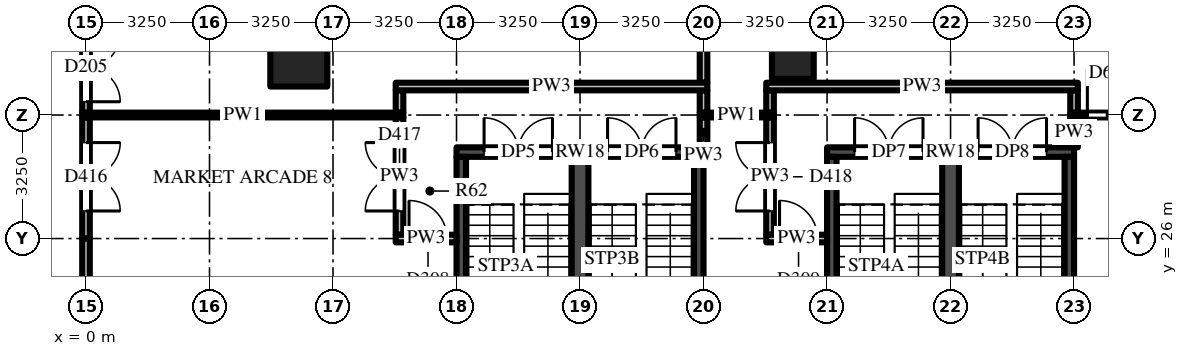
"""IFC4 building model, lengths in metres.
Left out: names, types, materials, properties, quantities, classifications, styles, units other than length and angle.
Written with IfcOpenShell. Run it as: python <this file> out.ifc"""

import sys

from ifc_helpers import new_model, si_unit, direction, frame, frame_2d, origin, origin_2d, place, context, subcontext, project, spatial, rectangle, extrude, source, transform, mapped, element, fill, save


model = new_model("IFC4")
c1 = context("Model", 3, precision=1e-05, world=origin(), true_north=direction((0.0, 1.0)))
c2 = subcontext(c1, "Body", "Model", "MODEL_VIEW")
j1 = project(units=[si_unit("LENGTHUNIT", "METRE"), si_unit("PLANEANGLEUNIT", "RADIAN")], contexts=[c1])
p1 = place(None, origin())
s1 = spatial("IfcSite", under=j1, at=p1, CompositionType="ELEMENT")
p2 = place(p1, origin())
s2 = spatial("IfcBuilding", under=s1, at=p2, CompositionType="ELEMENT")
p3 = place(p2, frame((0.0, 0.0, 19.0)))
s3 = spatial("IfcBuildingStorey", under=s2, at=p3, CompositionType="ELEMENT", Elevation=19.0)
m1 = source(origin(), c2, "Body", "SweptSolid", [
    extrude(rectangle(XDim=1.5, YDim=1.5, at=origin_2d()), origin(), (0.0, 0.0, 1.0), 5.0),
])
p4 = place(p3, frame((5.6, 30.75, 0.0), z_axis=(0.0, 0.0, 1.0), x_axis=(1.0, 0.0, 0.0)))
e1 = element("IfcColumn", 1, at=p4, inside=s3, PredefinedType="COLUMN", context=c2, shape_type="MappedRepresentation", body=[
    mapped(m1, transform((0.0, 0.0, 0.0))),
])
m2 = source(origin(), c2, "Body", "SweptSolid", [
    extrude(rectangle(XDim=1.1, YDim=1.1, at=origin_2d()), origin(), (0.0, 0.0, 1.0), 5.0),
])
p5 = place(p3, frame((18.6, 30.75, 0.0), z_axis=(0.0, 0.0, 1.0), x_axis=(1.0, 0.0, 0.0)))
e2 = element("IfcColumn", 2, at=p5, inside=s3, PredefinedType="COLUMN", context=c2, shape_type="MappedRepresentation", body=[
    mapped(m2, transform((0.0, 0.0, 0.0))),
])
m3 = source(origin(), c2, "Body", "SweptSolid", [
    extrude(rectangle(XDim=6.5, YDim=0.25, at=frame_2d((3.25, 0.0))), origin(), (0.0, 0.0, 1.0), 4.7),
])
p6 = place(p3, frame((9.75, 28.275, 0.0), z_axis=(0.0, 0.0, 1.0), x_axis=(1.0, 0.0, 0.0)))
e3 = element("IfcWall", 3, at=p6, inside=s3, PredefinedType="SHEAR", context=c2, shape_type="MappedRepresentation", body=[
    mapped(m3, transform((0.0, 0.0, 0.0))),
])
m4 = source(origin(), c2, "Body", "SweptSolid", [
    extrude(rectangle(XDim=1.8, YDim=2.1, at=frame_2d((0.9, 1.05))), frame((0.0, 0.135, 0.0), z_axis=(0.0, -1.0, 0.0), x_axis=(1.0, 0.0, 0.0)), (0.0, 0.0, 1.0), 0.27),
])
p7 = place(p6, frame((0.725, 0.0, 0.0)))
e4 = element("IfcOpeningElement", 4, at=p7, cuts=e3, PredefinedType="OPENING", context=c2, shape_type="MappedRepresentation", body=[
    mapped(m4, transform((0.0, 0.0, 0.0))),
])
p8 = place(p6, frame((3.975, 0.0, 0.0)))
e5 = element("IfcOpeningElement", 5, at=p8, cuts=e3, PredefinedType="OPENING", context=c2, shape_type="MappedRepresentation", body=[
    mapped(m4, transform((0.0, 0.0, 0.0))),
])
m5 = source(origin(), c2, "Body", "SweptSolid", [
    extrude(rectangle(XDim=8.3, YDim=0.25, at=frame_2d((4.15, 0.0))), origin(), (0.0, 0.0, 1.0), 4.7),
])
for number, where, z_axis, x_axis in (
    (6, (9.875, 19.85, 0.0), (0.0, 0.0, 1.0), (0.0, 1.0, 0.0)),
    (7, (16.125, 19.85, 0.0), (0.0, 0.0, 1.0), (0.0, 1.0, 0.0)),
):
    element("IfcWall", number, at=place(p3, frame(where, z_axis=z_axis, x_axis=x_axis)), inside=s3, PredefinedType="SHEAR", context=c2, shape_type="MappedRepresentation", body=[
        mapped(m5, transform((0.0, 0.0, 0.0))),
    ])
m6 = source(origin(), c2, "Body", "SweptSolid", [
    extrude(rectangle(XDim=8.3, YDim=0.44, at=frame_2d((4.15, 0.0))), origin(), (0.0, 0.0, 1.0), 4.7),
])
p9 = place(p3, frame((13.0, 19.85, 0.0), z_axis=(0.0, 0.0, 1.0), x_axis=(0.0, 1.0, 0.0)))
e8 = element("IfcWall", 8, at=p9, inside=s3, PredefinedType="SHEAR", context=c2, shape_type="MappedRepresentation", body=[
    mapped(m6, transform((0.0, 0.0, 0.0))),
])
p10 = place(p3, frame((19.5, 28.275, 0.0), z_axis=(0.0, 0.0, 1.0), x_axis=(1.0, 0.0, 0.0)))
e9 = element("IfcWall", 9, at=p10, inside=s3, PredefinedType="SHEAR", context=c2, shape_type="MappedRepresentation", body=[
    mapped(m3, transform((0.0, 0.0, 0.0))),
])
p11 = place(p10, frame((0.725, 0.0, 0.0)))
e10 = element("IfcOpeningElement", 10, at=p11, cuts=e9, PredefinedType="OPENING", context=c2, shape_type="MappedRepresentation", body=[
    mapped(m4, transform((0.0, 0.0, 0.0))),
])
p12 = place(p10, frame((3.975, 0.0, 0.0)))
e11 = element("IfcOpeningElement", 11, at=p12, cuts=e9, PredefinedType="OPENING", context=c2, shape_type="MappedRepresentation", body=[
    mapped(m4, transform((0.0, 0.0, 0.0))),
])
for number, where, z_axis, x_axis in (
    (12, (19.625, 19.85, 0.0), (0.0, 0.0, 1.0), (0.0, 1.0, 0.0)),
    (13, (25.875, 19.85, 0.0), (0.0, 0.0, 1.0), (0.0, 1.0, 0.0)),
):
    element("IfcWall", number, at=place(p3, frame(where, z_axis=z_axis, x_axis=x_axis)), inside=s3, PredefinedType="SHEAR", context=c2, shape_type="MappedRepresentation", body=[
        mapped(m5, transform((0.0, 0.0, 0.0))),
    ])
p13 = place(p3, frame((22.75, 19.85, 0.0), z_axis=(0.0, 0.0, 1.0), x_axis=(0.0, 1.0, 0.0)))
e14 = element("IfcWall", 14, at=p13, inside=s3, PredefinedType="SHEAR", context=c2, shape_type="MappedRepresentation", body=[
    mapped(m6, transform((0.0, 0.0, 0.0))),
])
m7 = source(origin(), c2, "Body", "SweptSolid", [
    extrude(rectangle(XDim=3.188, YDim=0.2, at=frame_2d((1.594, 0.0))), origin(), (0.0, 0.0, 1.0), 3.996),
])
p14 = place(p3, frame((0.0, 29.188, 0.0), z_axis=(0.0, 0.0, 1.0), x_axis=(0.0, -1.0, 0.0)))
e15 = element("IfcWall", 15, at=p14, inside=s3, PredefinedType="PARTITIONING", context=c2, shape_type="MappedRepresentation", body=[
    mapped(m7, transform((0.0, 0.0, 0.0))),
])
m8 = source(origin(), c2, "Body", "SweptSolid", [
    extrude(rectangle(XDim=1.8, YDim=2.1, at=frame_2d((0.9, 1.05))), frame((0.0, 0.11, 0.0), z_axis=(0.0, -1.0, 0.0), x_axis=(1.0, 0.0, 0.0)), (0.0, 0.0, 1.0), 0.22),
])
p15 = place(p14, frame((0.663, 0.0, 0.0)))
e16 = element("IfcOpeningElement", 16, at=p15, cuts=e15, PredefinedType="OPENING", context=c2, shape_type="MappedRepresentation", body=[
    mapped(m8, transform((0.0, 0.0, 0.0))),
])
m9 = source(origin(), c2, "Body", "SweptSolid", [
    extrude(rectangle(XDim=6.5, YDim=0.2, at=frame_2d((3.25, 0.0))), origin(), (0.0, 0.0, 1.0), 3.996),
])
p16 = place(p3, frame((0.0, 26.0, 0.0), z_axis=(0.0, 0.0, 1.0), x_axis=(0.0, -1.0, 0.0)))
e17 = element("IfcWall", 17, at=p16, inside=s3, PredefinedType="PARTITIONING", context=c2, shape_type="MappedRepresentation", body=[
    mapped(m9, transform((0.0, 0.0, 0.0))),
])
m10 = source(origin(), c2, "Body", "SweptSolid", [
    extrude(rectangle(XDim=9.488, YDim=0.2, at=frame_2d((4.744, 0.0))), origin(), (0.0, 0.0, 1.0), 3.918),
])
p17 = place(p3, frame((0.0, 38.8, 0.0), z_axis=(0.0, 0.0, 1.0), x_axis=(0.0, -1.0, 0.0)))
e18 = element("IfcWall", 18, at=p17, inside=s3, PredefinedType="PARTITIONING", context=c2, shape_type="MappedRepresentation", body=[
    mapped(m10, transform((0.0, 0.0, 0.0))),
])
p18 = place(p17, frame((7.4, 0.0, 0.0)))
e19 = element("IfcOpeningElement", 19, at=p18, cuts=e18, PredefinedType="OPENING", context=c2, shape_type="MappedRepresentation", body=[
    mapped(m8, transform((0.0, 0.0, 0.0))),
])
m11 = source(origin(), c2, "Body", "SweptSolid", [
    extrude(rectangle(XDim=3.087, YDim=0.2, at=frame_2d((1.544, 0.0))), origin(), (0.0, 0.0, 1.0), 4.274),
])
p19 = place(p3, frame((8.25, 26.1, 0.0), z_axis=(0.0, 0.0, 1.0), x_axis=(0.0, 1.0, 0.0)))
e20 = element("IfcWall", 20, at=p19, inside=s3, PredefinedType="PARTITIONING", context=c2, shape_type="MappedRepresentation", body=[
    mapped(m11, transform((0.0, 0.0, 0.0))),
])
p20 = place(p19, frame((0.625, 0.0, 0.0)))
e21 = element("IfcOpeningElement", 21, at=p20, cuts=e20, PredefinedType="OPENING", context=c2, shape_type="MappedRepresentation", body=[
    mapped(m8, transform((0.0, 0.0, 0.0))),
])
m12 = source(origin(), c2, "Body", "SweptSolid", [
    extrude(rectangle(XDim=0.587, YDim=0.2, at=frame_2d((0.294, 0.0))), origin(), (0.0, 0.0, 1.0), 4.7),
])
p21 = place(p3, frame((8.25, 29.312, 0.0), z_axis=(0.0, 0.0, 1.0), x_axis=(0.0, 1.0, 0.0)))
e22 = element("IfcWall", 22, at=p21, inside=s3, PredefinedType="PARTITIONING", context=c2, shape_type="MappedRepresentation", body=[
    mapped(m12, transform((0.0, 0.0, 0.0))),
])
m13 = source(origin(), c2, "Body", "SweptSolid", [
    extrude(rectangle(XDim=0.788, YDim=0.2, at=frame_2d((0.394, 0.0))), origin(), (0.0, 0.0, 1.0), 4.7),
])
p22 = place(p3, frame((16.25, 28.4, 0.0), z_axis=(0.0, 0.0, 1.0), x_axis=(0.0, 1.0, 0.0)))
e23 = element("IfcWall", 23, at=p22, inside=s3, PredefinedType="PARTITIONING", context=c2, shape_type="MappedRepresentation", body=[
    mapped(m13, transform((0.0, 0.0, 0.0))),
])
m14 = source(origin(), c2, "Body", "SweptSolid", [
    extrude(rectangle(XDim=8.7, YDim=0.2, at=frame_2d((4.35, 0.0))), origin(), (0.0, 0.0, 1.0), 3.762),
])
p23 = place(p3, frame((16.25, 30.1, 0.0), z_axis=(0.0, 0.0, 1.0), x_axis=(0.0, 1.0, 0.0)))
e24 = element("IfcWall", 24, at=p23, inside=s3, PredefinedType="PARTITIONING", context=c2, shape_type="MappedRepresentation", body=[
    mapped(m14, transform((0.0, 0.0, 0.0))),
])
p24 = place(p3, frame((16.25, 29.9, 0.0), z_axis=(0.0, 0.0, 1.0), x_axis=(0.0, -1.0, 0.0)))
e25 = element("IfcWall", 25, at=p24, inside=s3, PredefinedType="PARTITIONING", context=c2, shape_type="MappedRepresentation", body=[
    mapped(m12, transform((0.0, 0.0, 0.0))),
])
p25 = place(p3, frame((18.0, 26.1, 0.0), z_axis=(0.0, 0.0, 1.0), x_axis=(0.0, 1.0, 0.0)))
e26 = element("IfcWall", 26, at=p25, inside=s3, PredefinedType="PARTITIONING", context=c2, shape_type="MappedRepresentation", body=[
    mapped(m11, transform((0.0, 0.0, 0.0))),
])
p26 = place(p25, frame((0.625, 0.0, 0.0)))
e27 = element("IfcOpeningElement", 27, at=p26, cuts=e26, PredefinedType="OPENING", context=c2, shape_type="MappedRepresentation", body=[
    mapped(m8, transform((0.0, 0.0, 0.0))),
])
p27 = place(p3, frame((18.0, 29.9, 0.0), z_axis=(0.0, 0.0, 1.0), x_axis=(0.0, -1.0, 0.0)))
e28 = element("IfcWall", 28, at=p27, inside=s3, PredefinedType="PARTITIONING", context=c2, shape_type="MappedRepresentation", body=[
    mapped(m12, transform((0.0, 0.0, 0.0))),
])
p28 = place(p3, frame((26.0, 28.4, 0.0), z_axis=(0.0, 0.0, 1.0), x_axis=(0.0, 1.0, 0.0)))
e29 = element("IfcWall", 29, at=p28, inside=s3, PredefinedType="PARTITIONING", context=c2, shape_type="MappedRepresentation", body=[
    mapped(m13, transform((0.0, 0.0, 0.0))),
])
p29 = place(p3, frame((26.0, 29.9, 0.0), z_axis=(0.0, 0.0, 1.0), x_axis=(0.0, -1.0, 0.0)))
e30 = element("IfcWall", 30, at=p29, inside=s3, PredefinedType="PARTITIONING", context=c2, shape_type="MappedRepresentation", body=[
    mapped(m12, transform((0.0, 0.0, 0.0))),
])
m15 = source(origin(), c2, "Body", "SweptSolid", [
    extrude(rectangle(XDim=1.6, YDim=0.2, at=frame_2d((0.8, 0.0))), origin(), (0.0, 0.0, 1.0), 4.7),
])
p30 = place(p3, frame((8.15, 26.0, 0.0), z_axis=(0.0, 0.0, 1.0), x_axis=(1.0, 0.0, 0.0)))
e31 = element("IfcWall", 31, at=p30, inside=s3, PredefinedType="PARTITIONING", context=c2, shape_type="MappedRepresentation", body=[
    mapped(m15, transform((0.0, 0.0, 0.0))),
])
m16 = source(origin(), c2, "Body", "SweptSolid", [
    extrude(rectangle(XDim=1.0, YDim=2.1, at=frame_2d((0.5, 1.05))), frame((0.0, 0.11, 0.0), z_axis=(0.0, -1.0, 0.0), x_axis=(1.0, 0.0, 0.0)), (0.0, 0.0, 1.0), 0.22),
])
p31 = place(p30, frame((0.35, 0.0, 0.0)))
e32 = element("IfcOpeningElement", 32, at=p31, cuts=e31, PredefinedType="OPENING", context=c2, shape_type="MappedRepresentation", body=[
    mapped(m16, transform((0.0, 0.0, 0.0))),
])
m17 = source(origin(), c2, "Body", "SweptSolid", [
    extrude(rectangle(XDim=1.6, YDim=0.2, at=frame_2d((0.8, 0.0))), origin(), (0.0, 0.0, 1.0), 3.762),
])
p32 = place(p3, frame((17.9, 26.0, 0.0), z_axis=(0.0, 0.0, 1.0), x_axis=(1.0, 0.0, 0.0)))
e33 = element("IfcWall", 33, at=p32, inside=s3, PredefinedType="PARTITIONING", context=c2, shape_type="MappedRepresentation", body=[
    mapped(m17, transform((0.0, 0.0, 0.0))),
])
p33 = place(p32, frame((0.35, 0.0, 0.0)))
e34 = element("IfcOpeningElement", 34, at=p33, cuts=e33, PredefinedType="OPENING", context=c2, shape_type="MappedRepresentation", body=[
    mapped(m16, transform((0.0, 0.0, 0.0))),
])
m18 = source(origin(), c2, "Body", "SweptSolid", [
    extrude(rectangle(XDim=8.45, YDim=0.125, at=frame_2d((4.225, 0.0))), origin(), (0.0, 0.0, 1.0), 3.762),
])
p34 = place(p3, frame((-0.1, 29.25, 0.0), z_axis=(0.0, 0.0, 1.0), x_axis=(1.0, 0.0, 0.0)))
e35 = element("IfcWall", 35, at=p34, inside=s3, PredefinedType="PARTITIONING", context=c2, shape_type="MappedRepresentation", body=[
    mapped(m18, transform((0.0, 0.0, 0.0))),
])
m19 = source(origin(), c2, "Body", "SweptSolid", [
    extrude(rectangle(XDim=1.95, YDim=0.125, at=frame_2d((0.975, 0.0))), origin(), (0.0, 0.0, 1.0), 4.7),
])
p35 = place(p3, frame((16.15, 29.25, 0.0), z_axis=(0.0, 0.0, 1.0), x_axis=(1.0, 0.0, 0.0)))
e36 = element("IfcWall", 36, at=p35, inside=s3, PredefinedType="PARTITIONING", context=c2, shape_type="MappedRepresentation", body=[
    mapped(m19, transform((0.0, 0.0, 0.0))),
])
m20 = source(origin(), c2, "Body", "SweptSolid", [
    extrude(rectangle(XDim=3.413, YDim=0.125, at=frame_2d((1.706, 0.0))), origin(), (0.0, 0.0, 1.0), 4.7),
])
p36 = place(p3, frame((25.9, 29.25, 0.0), z_axis=(0.0, 0.0, 1.0), x_axis=(1.0, 0.0, 0.0)))
e37 = element("IfcWall", 37, at=p36, inside=s3, PredefinedType="PARTITIONING", context=c2, shape_type="MappedRepresentation", body=[
    mapped(m20, transform((0.0, 0.0, 0.0))),
])
m21 = source(origin(), c2, "Body", "SweptSolid", [
    extrude(rectangle(XDim=1.2, YDim=2.1, at=frame_2d((0.6, 1.05))), frame((0.0, 0.073, 0.0), z_axis=(0.0, -1.0, 0.0), x_axis=(1.0, 0.0, 0.0)), (0.0, 0.0, 1.0), 0.145),
])
p37 = place(p36, frame((0.45, 0.0, 0.0)))
e38 = element("IfcOpeningElement", 38, at=p37, cuts=e37, PredefinedType="OPENING", context=c2, shape_type="MappedRepresentation", body=[
    mapped(m21, transform((0.0, 0.0, 0.0))),
])
m22 = source(origin(), c2, "Body", "SweptSolid", [
    extrude(rectangle(XDim=8.2, YDim=0.2, at=frame_2d((4.1, 0.0))), origin(), (0.0, 0.0, 1.0), 4.7),
])
p38 = place(p3, frame((8.15, 30.0, 0.0), z_axis=(0.0, 0.0, 1.0), x_axis=(1.0, 0.0, 0.0)))
e39 = element("IfcWall", 39, at=p38, inside=s3, PredefinedType="PARTITIONING", context=c2, shape_type="MappedRepresentation", body=[
    mapped(m22, transform((0.0, 0.0, 0.0))),
])
m23 = source(origin(), c2, "Body", "SweptSolid", [
    extrude(rectangle(XDim=8.2, YDim=0.2, at=frame_2d((4.1, 0.0))), origin(), (0.0, 0.0, 1.0), 3.762),
])
p39 = place(p3, frame((17.9, 30.0, 0.0), z_axis=(0.0, 0.0, 1.0), x_axis=(1.0, 0.0, 0.0)))
e40 = element("IfcWall", 40, at=p39, inside=s3, PredefinedType="PARTITIONING", context=c2, shape_type="MappedRepresentation", body=[
    mapped(m23, transform((0.0, 0.0, 0.0))),
])
m24 = source(origin(), c2, "Body", "SweptSolid", [
    extrude(rectangle(XDim=1.8, YDim=2.1, at=frame_2d((0.9, 1.05))), frame((0.0, 0.025, 0.0), z_axis=(0.0, -1.0, 0.0), x_axis=(1.0, 0.0, 0.0)), (0.0, 0.0, 1.0), 0.05),
])
p40 = place(p7, origin())
e41 = element("IfcDoor", 41, at=p40, inside=s3, OperationType="DOUBLE_DOOR_SINGLE_SWING", PredefinedType="DOOR", context=c2, shape_type="MappedRepresentation", body=[
    mapped(m24, transform((0.0, 0.0, 0.0))),
])
fill(e4, e41)
p41 = place(p8, origin())
e42 = element("IfcDoor", 42, at=p41, inside=s3, OperationType="DOUBLE_DOOR_SINGLE_SWING", PredefinedType="DOOR", context=c2, shape_type="MappedRepresentation", body=[
    mapped(m24, transform((0.0, 0.0, 0.0))),
])
fill(e5, e42)
p42 = place(p11, origin())
e43 = element("IfcDoor", 43, at=p42, inside=s3, OperationType="DOUBLE_DOOR_SINGLE_SWING", PredefinedType="DOOR", context=c2, shape_type="MappedRepresentation", body=[
    mapped(m24, transform((0.0, 0.0, 0.0))),
])
fill(e10, e43)
p43 = place(p12, origin())
e44 = element("IfcDoor", 44, at=p43, inside=s3, OperationType="DOUBLE_DOOR_SINGLE_SWING", PredefinedType="DOOR", context=c2, shape_type="MappedRepresentation", body=[
    mapped(m24, transform((0.0, 0.0, 0.0))),
])
fill(e11, e44)
m25 = source(origin(), c2, "Body", "SweptSolid", [
    extrude(rectangle(XDim=1.0, YDim=2.1, at=frame_2d((0.5, 1.05))), frame((0.0, 0.025, 0.0), z_axis=(0.0, -1.0, 0.0), x_axis=(1.0, 0.0, 0.0)), (0.0, 0.0, 1.0), 0.05),
])
p44 = place(p31, origin())
e45 = element("IfcDoor", 45, at=p44, inside=s3, OperationType="SINGLE_SWING_LEFT", PredefinedType="DOOR", context=c2, shape_type="MappedRepresentation", body=[
    mapped(m25, transform((0.0, 0.0, 0.0))),
])
fill(e32, e45)
p45 = place(p33, origin())
e46 = element("IfcDoor", 46, at=p45, inside=s3, OperationType="SINGLE_SWING_LEFT", PredefinedType="DOOR", context=c2, shape_type="MappedRepresentation", body=[
    mapped(m25, transform((0.0, 0.0, 0.0))),
])
fill(e34, e46)
p46 = place(p15, origin())
e47 = element("IfcDoor", 47, at=p46, inside=s3, OperationType="DOUBLE_DOOR_SINGLE_SWING", PredefinedType="DOOR", context=c2, shape_type="MappedRepresentation", body=[
    mapped(m24, transform((0.0, 0.0, 0.0))),
])
fill(e16, e47)
p47 = place(p20, origin())
e48 = element("IfcDoor", 48, at=p47, inside=s3, OperationType="DOUBLE_DOOR_SINGLE_SWING", PredefinedType="DOOR", context=c2, shape_type="MappedRepresentation", body=[
    mapped(m24, transform((0.0, 0.0, 0.0))),
])
fill(e21, e48)
p48 = place(p26, origin())
e49 = element("IfcDoor", 49, at=p48, inside=s3, OperationType="DOUBLE_DOOR_SINGLE_SWING", PredefinedType="DOOR", context=c2, shape_type="MappedRepresentation", body=[
    mapped(m24, transform((0.0, 0.0, 0.0))),
])
fill(e27, e49)
m26 = source(origin(), c2, "Body", "SweptSolid", [
    extrude(rectangle(XDim=1.2, YDim=2.1, at=frame_2d((0.6, 1.05))), frame((0.0, 0.025, 0.0), z_axis=(0.0, -1.0, 0.0), x_axis=(1.0, 0.0, 0.0)), (0.0, 0.0, 1.0), 0.05),
])
p49 = place(p37, origin())
e50 = element("IfcDoor", 50, at=p49, inside=s3, OperationType="SINGLE_SWING_LEFT", PredefinedType="DOOR", context=c2, shape_type="MappedRepresentation", body=[
    mapped(m26, transform((0.0, 0.0, 0.0))),
])
fill(e38, e50)
p50 = place(p18, origin())
e51 = element("IfcDoor", 51, at=p50, inside=s3, OperationType="DOUBLE_DOOR_SINGLE_SWING", PredefinedType="DOOR", context=c2, shape_type="MappedRepresentation", body=[
    mapped(m24, transform((0.0, 0.0, 0.0))),
])
fill(e19, e51)
save(model, sys.argv[1])
